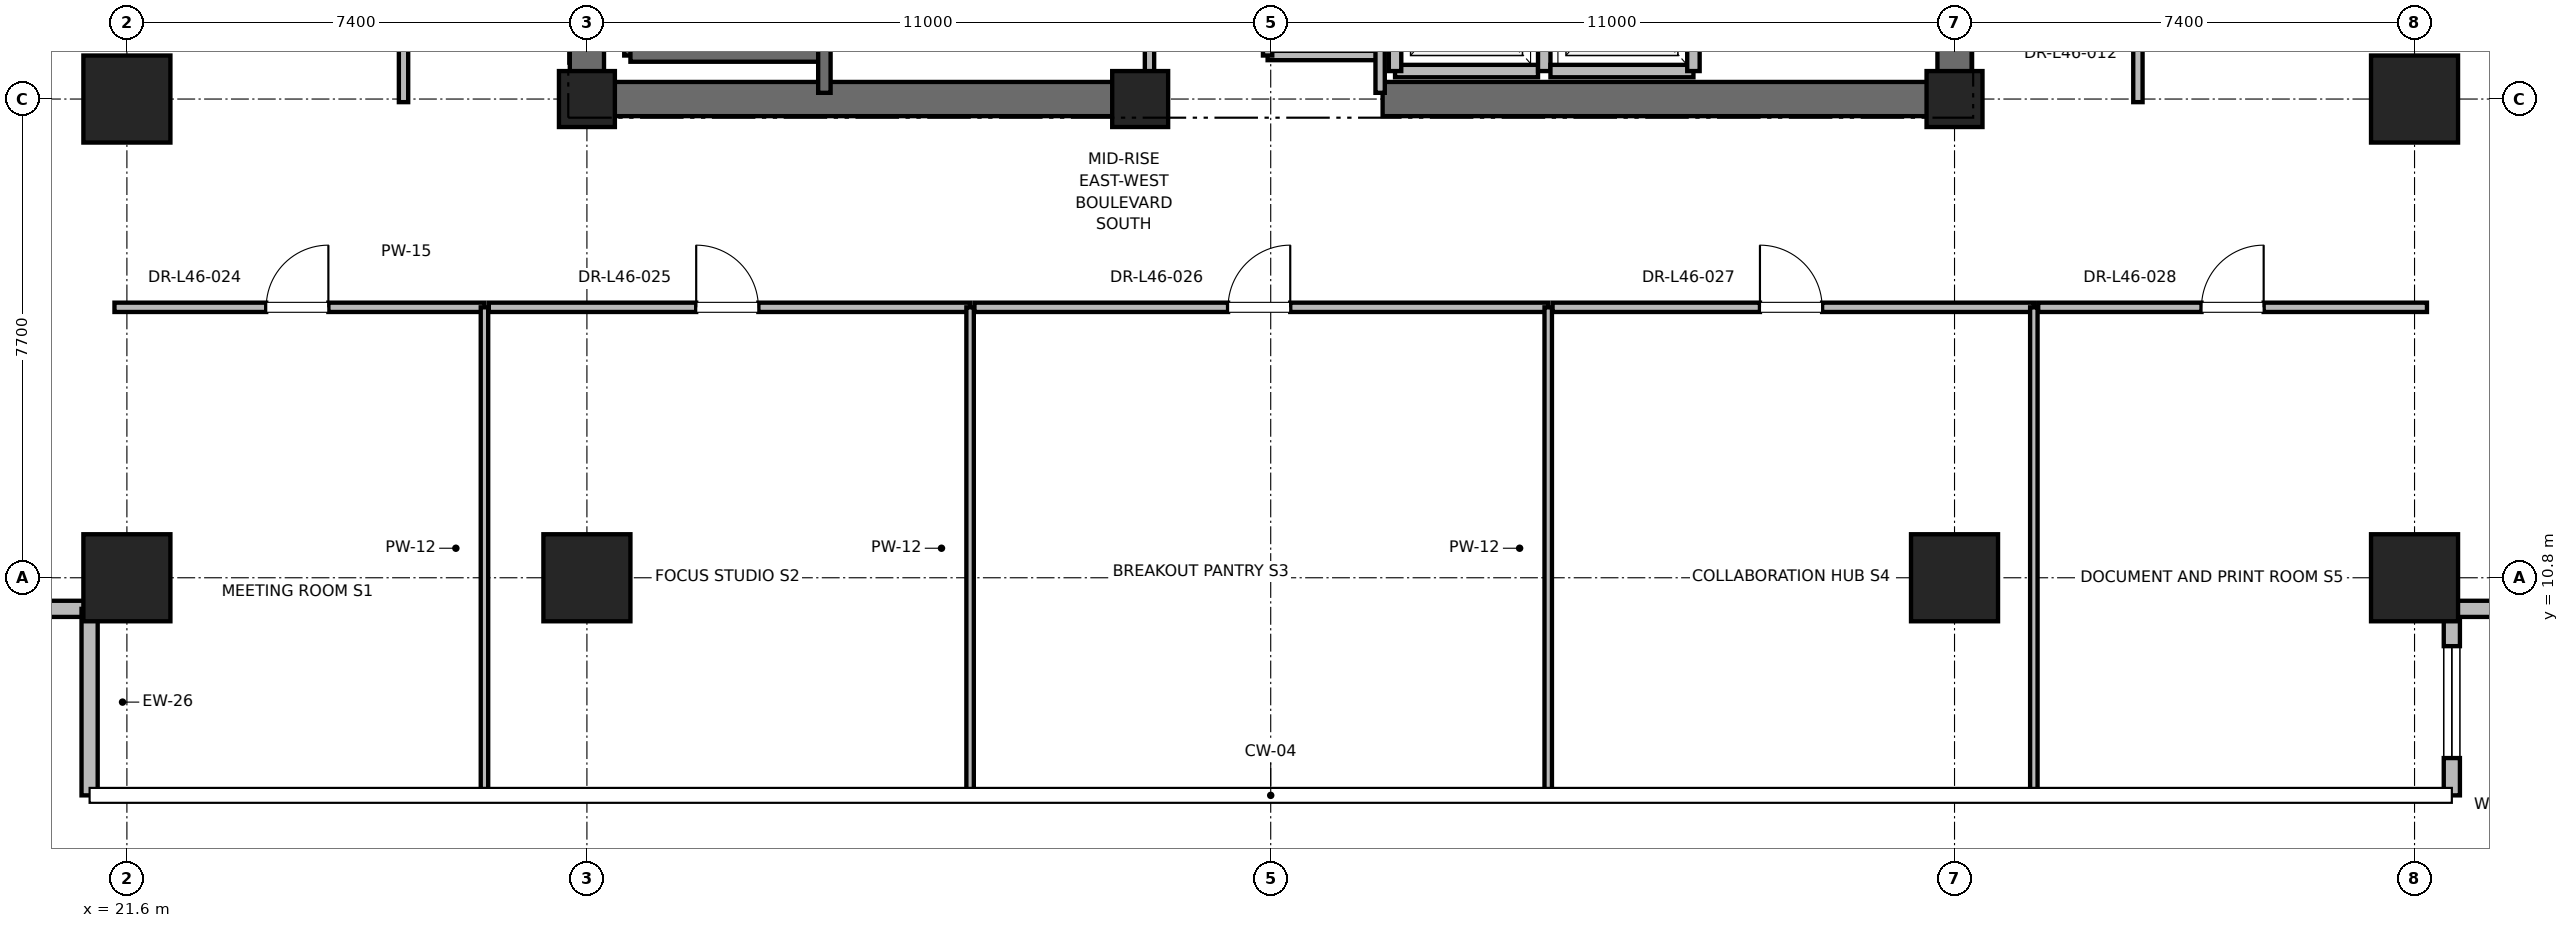
"""IFC4 building model, lengths in metres.
Left out: names, types, materials, properties, quantities, classifications, styles, units other than length and angle.
Written with IfcOpenShell. Run it as: python <this file> out.ifc"""

import sys

from ifc_helpers import new_model, si_unit, direction, frame, frame_2d, origin, origin_2d, place, context, subcontext, project, spatial, rectangle, extrude, element, fill, save


model = new_model("IFC4")
c1 = context("Model", 3, precision=1e-05, world=origin(), true_north=direction((0.0, 1.0)))
c2 = subcontext(c1, "Body", "Model", "MODEL_VIEW")
j1 = project(units=[si_unit("LENGTHUNIT", "METRE"), si_unit("PLANEANGLEUNIT", "RADIAN")], contexts=[c1])
p1 = place(None, origin())
s1 = spatial("IfcSite", under=j1, at=p1, CompositionType="ELEMENT")
p2 = place(p1, origin())
s2 = spatial("IfcBuilding", under=s1, at=p2, CompositionType="ELEMENT")
p3 = place(p2, frame((0.0, 0.0, 200.2)))
s3 = spatial("IfcBuildingStorey", under=s2, at=p3, CompositionType="ELEMENT", Elevation=200.2)
for number, where, z_axis, x_axis in (
    (1, (29.0, 10.8, 0.0), (0.0, 0.0, 1.0), (1.0, 0.0, 0.0)),
    (2, (51.0, 10.8, 0.0), (0.0, 0.0, 1.0), (1.0, 0.0, 0.0)),
    (3, (21.6, 18.5, 0.0), (0.0, 0.0, 1.0), (1.0, 0.0, 0.0)),
    (4, (58.4, 18.5, 0.0), (0.0, 0.0, 1.0), (1.0, 0.0, 0.0)),
    (5, (21.6, 10.8, 0.0), (0.0, 0.0, 1.0), (1.0, 0.0, 0.0)),
    (6, (58.4, 10.8, 0.0), (0.0, 0.0, 1.0), (1.0, 0.0, 0.0)),
):
    element("IfcColumn", number, at=place(p3, frame(where, z_axis=z_axis, x_axis=x_axis)), inside=s3, PredefinedType="COLUMN", context=c2, shape_type="SweptSolid", body=[
        extrude(rectangle(XDim=1.4, YDim=1.4, at=origin_2d()), origin(), (0.0, 0.0, 1.0), 5.0),
    ])
for number, where, z_axis, x_axis in (
    (7, (29.0, 18.5, 0.0), (0.0, 0.0, 1.0), (1.0, 0.0, 0.0)),
    (8, (51.0, 18.5, 0.0), (0.0, 0.0, 1.0), (1.0, 0.0, 0.0)),
    (9, (37.9, 18.5, 0.0), (0.0, 0.0, 1.0), (1.0, 0.0, 0.0)),
):
    element("IfcColumn", number, at=place(p3, frame(where, z_axis=z_axis, x_axis=x_axis)), inside=s3, PredefinedType="PILASTER", context=c2, shape_type="SweptSolid", body=[
        extrude(rectangle(XDim=0.9, YDim=0.9, at=origin_2d()), origin(), (0.0, 0.0, 1.0), 5.0),
    ])
for number, where, z_axis, x_axis in (
    (10, (29.0, 18.5, 0.0), (0.0, 0.0, 1.0), (1.0, 0.0, 0.0)),
    (11, (41.8, 18.5, 0.0), (0.0, 0.0, 1.0), (1.0, 0.0, 0.0)),
):
    element("IfcWall", number, at=place(p3, frame(where, z_axis=z_axis, x_axis=x_axis)), inside=s3, PredefinedType="SHEAR", context=c2, shape_type="SweptSolid", body=[
        extrude(rectangle(XDim=9.2, YDim=0.55, at=frame_2d((4.6, 0.0))), origin(), (0.0, 0.0, 1.0), 4.775),
    ])
p4 = place(p3, frame((29.0, 18.5, 0.0), z_axis=(0.0, 0.0, 1.0), x_axis=(0.0, 1.0, 0.0)))
e12 = element("IfcWall", 12, at=p4, inside=s3, PredefinedType="SHEAR", context=c2, shape_type="SweptSolid", body=[
    extrude(rectangle(XDim=8.8, YDim=0.55, at=frame_2d((4.4, 0.0))), origin(), (0.0, 0.0, 1.0), 4.775),
])
p5 = place(p3, frame((51.0, 18.5, 0.0), z_axis=(0.0, 0.0, 1.0), x_axis=(0.0, 1.0, 0.0)))
e13 = element("IfcWall", 13, at=p5, inside=s3, PredefinedType="SHEAR", context=c2, shape_type="SweptSolid", body=[
    extrude(rectangle(XDim=5.8, YDim=0.55, at=frame_2d((2.9, 0.0))), origin(), (0.0, 0.0, 1.0), 4.775),
])
p6 = place(p3, frame((17.6, 10.3, 0.0), z_axis=(0.0, 0.0, 1.0), x_axis=(1.0, 0.0, 0.0)))
e14 = element("IfcWall", 14, at=p6, inside=s3, PredefinedType="PARAPET", context=c2, shape_type="SweptSolid", body=[
    extrude(rectangle(XDim=3.4, YDim=0.26, at=frame_2d((1.7, 0.0))), origin(), (0.0, 0.0, 1.0), 4.775),
])
p7 = place(p6, frame((0.8, 0.0, 0.85)))
e15 = element("IfcOpeningElement", 15, at=p7, cuts=e14, PredefinedType="OPENING", context=c2, shape_type="SweptSolid", body=[
    extrude(rectangle(XDim=1.8, YDim=2.2, at=frame_2d((0.9, 1.1))), frame((0.0, 0.13, 0.0), z_axis=(0.0, -1.0, 0.0), x_axis=(1.0, 0.0, 0.0)), (0.0, 0.0, 1.0), 0.26),
])
p8 = place(p3, frame((21.0, 10.3, 0.0), z_axis=(0.0, 0.0, 1.0), x_axis=(0.0, -1.0, 0.0)))
e16 = element("IfcWall", 16, at=p8, inside=s3, PredefinedType="PARAPET", context=c2, shape_type="SweptSolid", body=[
    extrude(rectangle(XDim=3.0, YDim=0.26, at=frame_2d((1.5, 0.0))), origin(), (0.0, 0.0, 1.0), 4.775),
])
p9 = place(p3, frame((59.0, 7.3, 0.0), z_axis=(0.0, 0.0, 1.0), x_axis=(0.0, 1.0, 0.0)))
e17 = element("IfcWall", 17, at=p9, inside=s3, PredefinedType="PARAPET", context=c2, shape_type="SweptSolid", body=[
    extrude(rectangle(XDim=3.0, YDim=0.26, at=frame_2d((1.5, 0.0))), origin(), (0.0, 0.0, 1.0), 4.775),
])
p10 = place(p9, frame((0.6, 0.0, 0.85)))
e18 = element("IfcOpeningElement", 18, at=p10, cuts=e17, PredefinedType="OPENING", context=c2, shape_type="SweptSolid", body=[
    extrude(rectangle(XDim=1.8, YDim=2.2, at=frame_2d((0.9, 1.1))), frame((0.0, 0.13, 0.0), z_axis=(0.0, -1.0, 0.0), x_axis=(1.0, 0.0, 0.0)), (0.0, 0.0, 1.0), 0.26),
])
p11 = place(p3, frame((59.0, 10.3, 0.0), z_axis=(0.0, 0.0, 1.0), x_axis=(1.0, 0.0, 0.0)))
e19 = element("IfcWall", 19, at=p11, inside=s3, PredefinedType="PARAPET", context=c2, shape_type="SweptSolid", body=[
    extrude(rectangle(XDim=3.4, YDim=0.26, at=frame_2d((1.7, 0.0))), origin(), (0.0, 0.0, 1.0), 4.775),
])
p12 = place(p3, frame((29.7, 19.2, 0.0), z_axis=(0.0, 0.0, 1.0), x_axis=(0.0, 1.0, 0.0)))
e20 = element("IfcWall", 20, at=p12, inside=s3, PredefinedType="SOLIDWALL", context=c2, shape_type="SweptSolid", body=[
    extrude(rectangle(XDim=8.15, YDim=0.2, at=frame_2d((4.075, 0.0))), origin(), (0.0, 0.0, 1.0), 4.775),
])
p13 = place(p3, frame((29.7, 19.2, 0.0), z_axis=(0.0, 0.0, 1.0), x_axis=(1.0, 0.0, 0.0)))
e21 = element("IfcWall", 21, at=p13, inside=s3, PredefinedType="SOLIDWALL", context=c2, shape_type="SweptSolid", body=[
    extrude(rectangle(XDim=3.12, YDim=0.2, at=frame_2d((1.56, 0.0))), origin(), (0.0, 0.0, 1.0), 4.775),
])
p14 = place(p3, frame((32.82, 18.6, 0.0), z_axis=(0.0, 0.0, 1.0), x_axis=(0.0, 1.0, 0.0)))
e22 = element("IfcWall", 22, at=p14, inside=s3, PredefinedType="SOLIDWALL", context=c2, shape_type="SweptSolid", body=[
    extrude(rectangle(XDim=8.78, YDim=0.2, at=frame_2d((4.39, 0.0))), origin(), (0.0, 0.0, 1.0), 4.775),
])
p15 = place(p3, frame((42.0, 18.95, 0.0), z_axis=(0.0, 0.0, 1.0), x_axis=(1.0, 0.0, 0.0)))
e23 = element("IfcWall", 23, at=p15, inside=s3, PredefinedType="SOLIDWALL", context=c2, shape_type="SweptSolid", body=[
    extrude(rectangle(XDim=2.3, YDim=0.2, at=frame_2d((1.15, 0.0))), origin(), (0.0, 0.0, 1.0), 3.755),
])
p16 = place(p3, frame((42.0, 21.55, 0.0), z_axis=(0.0, 0.0, 1.0), x_axis=(0.0, -1.0, 0.0)))
e24 = element("IfcWall", 24, at=p16, inside=s3, PredefinedType="SOLIDWALL", context=c2, shape_type="SweptSolid", body=[
    extrude(rectangle(XDim=2.6, YDim=0.2, at=frame_2d((1.3, 0.0))), origin(), (0.0, 0.0, 1.0), 3.755),
])
p17 = place(p3, frame((44.4, 18.95, 0.0), z_axis=(0.0, 0.0, 1.0), x_axis=(0.0, 1.0, 0.0)))
e25 = element("IfcWall", 25, at=p17, inside=s3, PredefinedType="SOLIDWALL", context=c2, shape_type="SweptSolid", body=[
    extrude(rectangle(XDim=2.6, YDim=0.2, at=frame_2d((1.3, 0.0))), origin(), (0.0, 0.0, 1.0), 4.775),
])
p18 = place(p3, frame((44.5, 18.95, 0.0), z_axis=(0.0, 0.0, 1.0), x_axis=(1.0, 0.0, 0.0)))
e26 = element("IfcWall", 26, at=p18, inside=s3, PredefinedType="SOLIDWALL", context=c2, shape_type="SweptSolid", body=[
    extrude(rectangle(XDim=2.3, YDim=0.2, at=frame_2d((1.15, 0.0))), origin(), (0.0, 0.0, 1.0), 4.775),
])
p19 = place(p3, frame((46.8, 18.95, 0.0), z_axis=(0.0, 0.0, 1.0), x_axis=(0.0, 1.0, 0.0)))
e27 = element("IfcWall", 27, at=p19, inside=s3, PredefinedType="SOLIDWALL", context=c2, shape_type="SweptSolid", body=[
    extrude(rectangle(XDim=2.6, YDim=0.2, at=frame_2d((1.3, 0.0))), origin(), (0.0, 0.0, 1.0), 4.775),
])
p20 = place(p3, frame((39.95, 19.2, 0.0), z_axis=(0.0, 0.0, 1.0), x_axis=(1.0, 0.0, 0.0)))
e28 = element("IfcWall", 28, at=p20, inside=s3, PredefinedType="PARTITIONING", context=c2, shape_type="SweptSolid", body=[
    extrude(rectangle(XDim=1.81, YDim=0.15, at=frame_2d((0.905, 0.0))), origin(), (0.0, 0.0, 1.0), 2.85),
])
p21 = place(p3, frame((41.76, 18.6, 0.0), z_axis=(0.0, 0.0, 1.0), x_axis=(0.0, 1.0, 0.0)))
e29 = element("IfcWall", 29, at=p21, inside=s3, PredefinedType="PARTITIONING", context=c2, shape_type="SweptSolid", body=[
    extrude(rectangle(XDim=3.6, YDim=0.15, at=frame_2d((1.8, 0.0))), origin(), (0.0, 0.0, 1.0), 2.85),
])
p22 = place(p3, frame((39.95, 19.2, 0.0), z_axis=(0.0, 0.0, 1.0), x_axis=(0.0, 1.0, 0.0)))
e30 = element("IfcWall", 30, at=p22, inside=s3, PredefinedType="PARTITIONING", context=c2, shape_type="SweptSolid", body=[
    extrude(rectangle(XDim=3.0, YDim=0.15, at=frame_2d((1.5, 0.0))), origin(), (0.0, 0.0, 1.0), 2.85),
])
p23 = place(p22, frame((1.05, 0.0, 0.0)))
e31 = element("IfcOpeningElement", 31, at=p23, cuts=e30, PredefinedType="OPENING", context=c2, shape_type="SweptSolid", body=[
    extrude(rectangle(XDim=0.9, YDim=2.1, at=frame_2d((0.45, 1.05))), frame((0.0, 0.075, 0.0), z_axis=(0.0, -1.0, 0.0), x_axis=(1.0, 0.0, 0.0)), (0.0, 0.0, 1.0), 0.15),
])
p24 = place(p3, frame((38.05, 18.6, 0.0), z_axis=(0.0, 0.0, 1.0), x_axis=(0.0, 1.0, 0.0)))
e32 = element("IfcWall", 32, at=p24, inside=s3, PredefinedType="PARTITIONING", context=c2, shape_type="SweptSolid", body=[
    extrude(rectangle(XDim=8.78, YDim=0.15, at=frame_2d((4.39, 0.0))), origin(), (0.0, 0.0, 1.0), 2.85),
])
p25 = place(p24, frame((3.89, 0.0, 0.0)))
e33 = element("IfcOpeningElement", 33, at=p25, cuts=e32, PredefinedType="OPENING", context=c2, shape_type="SweptSolid", body=[
    extrude(rectangle(XDim=1.0, YDim=2.15, at=frame_2d((0.5, 1.075))), frame((0.0, 0.075, 0.0), z_axis=(0.0, -1.0, 0.0), x_axis=(1.0, 0.0, 0.0)), (0.0, 0.0, 1.0), 0.15),
])
p26 = place(p3, frame((21.4, 15.15, 0.0), z_axis=(0.0, 0.0, 1.0), x_axis=(1.0, 0.0, 0.0)))
e34 = element("IfcWall", 34, at=p26, inside=s3, PredefinedType="PARTITIONING", context=c2, shape_type="SweptSolid", body=[
    extrude(rectangle(XDim=5.952, YDim=0.15, at=frame_2d((2.976, 0.0))), origin(), (0.0, 0.0, 1.0), 2.85),
])
p27 = place(p26, frame((2.441, 0.0, 0.0)))
e35 = element("IfcOpeningElement", 35, at=p27, cuts=e34, PredefinedType="OPENING", context=c2, shape_type="SweptSolid", body=[
    extrude(rectangle(XDim=1.0, YDim=2.15, at=frame_2d((0.5, 1.075))), frame((0.0, 0.075, 0.0), z_axis=(0.0, -1.0, 0.0), x_axis=(1.0, 0.0, 0.0)), (0.0, 0.0, 1.0), 0.15),
])
p28 = place(p3, frame((27.352, 7.4, 0.0), z_axis=(0.0, 0.0, 1.0), x_axis=(0.0, 1.0, 0.0)))
e36 = element("IfcWall", 36, at=p28, inside=s3, PredefinedType="PARTITIONING", context=c2, shape_type="SweptSolid", body=[
    extrude(rectangle(XDim=7.75, YDim=0.12, at=frame_2d((3.875, 0.0))), origin(), (0.0, 0.0, 1.0), 2.85),
])
p29 = place(p3, frame((27.422, 15.15, 0.0), z_axis=(0.0, 0.0, 1.0), x_axis=(1.0, 0.0, 0.0)))
e37 = element("IfcWall", 37, at=p29, inside=s3, PredefinedType="PARTITIONING", context=c2, shape_type="SweptSolid", body=[
    extrude(rectangle(XDim=7.742, YDim=0.15, at=frame_2d((3.871, 0.0))), origin(), (0.0, 0.0, 1.0), 2.85),
])
p30 = place(p29, frame((3.336, 0.0, 0.0)))
e38 = element("IfcOpeningElement", 38, at=p30, cuts=e37, PredefinedType="OPENING", context=c2, shape_type="SweptSolid", body=[
    extrude(rectangle(XDim=1.0, YDim=2.15, at=frame_2d((0.5, 1.075))), frame((0.0, 0.075, 0.0), z_axis=(0.0, -1.0, 0.0), x_axis=(1.0, 0.0, 0.0)), (0.0, 0.0, 1.0), 0.15),
])
p31 = place(p3, frame((35.164, 7.4, 0.0), z_axis=(0.0, 0.0, 1.0), x_axis=(0.0, 1.0, 0.0)))
e39 = element("IfcWall", 39, at=p31, inside=s3, PredefinedType="PARTITIONING", context=c2, shape_type="SweptSolid", body=[
    extrude(rectangle(XDim=7.75, YDim=0.12, at=frame_2d((3.875, 0.0))), origin(), (0.0, 0.0, 1.0), 2.85),
])
p32 = place(p3, frame((35.234, 15.15, 0.0), z_axis=(0.0, 0.0, 1.0), x_axis=(1.0, 0.0, 0.0)))
e40 = element("IfcWall", 40, at=p32, inside=s3, PredefinedType="PARTITIONING", context=c2, shape_type="SweptSolid", body=[
    extrude(rectangle(XDim=9.23, YDim=0.15, at=frame_2d((4.615, 0.0))), origin(), (0.0, 0.0, 1.0), 2.85),
])
p33 = place(p32, frame((4.08, 0.0, 0.0)))
e41 = element("IfcOpeningElement", 41, at=p33, cuts=e40, PredefinedType="OPENING", context=c2, shape_type="SweptSolid", body=[
    extrude(rectangle(XDim=1.0, YDim=2.15, at=frame_2d((0.5, 1.075))), frame((0.0, 0.075, 0.0), z_axis=(0.0, -1.0, 0.0), x_axis=(1.0, 0.0, 0.0)), (0.0, 0.0, 1.0), 0.15),
])
p34 = place(p3, frame((44.464, 7.4, 0.0), z_axis=(0.0, 0.0, 1.0), x_axis=(0.0, 1.0, 0.0)))
e42 = element("IfcWall", 42, at=p34, inside=s3, PredefinedType="PARTITIONING", context=c2, shape_type="SweptSolid", body=[
    extrude(rectangle(XDim=7.75, YDim=0.12, at=frame_2d((3.875, 0.0))), origin(), (0.0, 0.0, 1.0), 2.85),
])
p35 = place(p3, frame((44.534, 15.15, 0.0), z_axis=(0.0, 0.0, 1.0), x_axis=(1.0, 0.0, 0.0)))
e43 = element("IfcWall", 43, at=p35, inside=s3, PredefinedType="PARTITIONING", context=c2, shape_type="SweptSolid", body=[
    extrude(rectangle(XDim=7.742, YDim=0.15, at=frame_2d((3.871, 0.0))), origin(), (0.0, 0.0, 1.0), 2.85),
])
p36 = place(p35, frame((3.336, 0.0, 0.0)))
e44 = element("IfcOpeningElement", 44, at=p36, cuts=e43, PredefinedType="OPENING", context=c2, shape_type="SweptSolid", body=[
    extrude(rectangle(XDim=1.0, YDim=2.15, at=frame_2d((0.5, 1.075))), frame((0.0, 0.075, 0.0), z_axis=(0.0, -1.0, 0.0), x_axis=(1.0, 0.0, 0.0)), (0.0, 0.0, 1.0), 0.15),
])
p37 = place(p3, frame((52.276, 7.4, 0.0), z_axis=(0.0, 0.0, 1.0), x_axis=(0.0, 1.0, 0.0)))
e45 = element("IfcWall", 45, at=p37, inside=s3, PredefinedType="PARTITIONING", context=c2, shape_type="SweptSolid", body=[
    extrude(rectangle(XDim=7.75, YDim=0.12, at=frame_2d((3.875, 0.0))), origin(), (0.0, 0.0, 1.0), 2.85),
])
p38 = place(p3, frame((52.346, 15.15, 0.0), z_axis=(0.0, 0.0, 1.0), x_axis=(1.0, 0.0, 0.0)))
e46 = element("IfcWall", 46, at=p38, inside=s3, PredefinedType="PARTITIONING", context=c2, shape_type="SweptSolid", body=[
    extrude(rectangle(XDim=6.254, YDim=0.15, at=frame_2d((3.127, 0.0))), origin(), (0.0, 0.0, 1.0), 2.85),
])
p39 = place(p38, frame((2.627, 0.0, 0.0)))
e47 = element("IfcOpeningElement", 47, at=p39, cuts=e46, PredefinedType="OPENING", context=c2, shape_type="SweptSolid", body=[
    extrude(rectangle(XDim=1.0, YDim=2.15, at=frame_2d((0.5, 1.075))), frame((0.0, 0.075, 0.0), z_axis=(0.0, -1.0, 0.0), x_axis=(1.0, 0.0, 0.0)), (0.0, 0.0, 1.0), 0.15),
])
p40 = place(p3, frame((26.05, 18.45, 0.0), z_axis=(0.0, 0.0, 1.0), x_axis=(0.0, 1.0, 0.0)))
e48 = element("IfcWall", 48, at=p40, inside=s3, PredefinedType="PARTITIONING", context=c2, shape_type="SweptSolid", body=[
    extrude(rectangle(XDim=5.249, YDim=0.15, at=frame_2d((2.625, 0.0))), origin(), (0.0, 0.0, 1.0), 2.85),
])
p41 = place(p40, frame((2.165, 0.0, 0.0)))
e49 = element("IfcOpeningElement", 49, at=p41, cuts=e48, PredefinedType="OPENING", context=c2, shape_type="SweptSolid", body=[
    extrude(rectangle(XDim=1.0, YDim=2.15, at=frame_2d((0.5, 1.075))), frame((0.0, 0.075, 0.0), z_axis=(0.0, -1.0, 0.0), x_axis=(1.0, 0.0, 0.0)), (0.0, 0.0, 1.0), 0.15),
])
p42 = place(p3, frame((53.95, 18.45, 0.0), z_axis=(0.0, 0.0, 1.0), x_axis=(0.0, 1.0, 0.0)))
e50 = element("IfcWall", 50, at=p42, inside=s3, PredefinedType="PARTITIONING", context=c2, shape_type="SweptSolid", body=[
    extrude(rectangle(XDim=3.982, YDim=0.15, at=frame_2d((1.991, 0.0))), origin(), (0.0, 0.0, 1.0), 2.85),
])
p43 = place(p42, frame((1.531, 0.0, 0.0)))
e51 = element("IfcOpeningElement", 51, at=p43, cuts=e50, PredefinedType="OPENING", context=c2, shape_type="SweptSolid", body=[
    extrude(rectangle(XDim=1.0, YDim=2.15, at=frame_2d((0.5, 1.075))), frame((0.0, 0.075, 0.0), z_axis=(0.0, -1.0, 0.0), x_axis=(1.0, 0.0, 0.0)), (0.0, 0.0, 1.0), 0.15),
])
p44 = place(p10, origin())
e52 = element("IfcWindow", 52, at=p44, inside=s3, PartitioningType="SINGLE_PANEL", PredefinedType="WINDOW", context=c2, shape_type="SweptSolid", body=[
    extrude(rectangle(XDim=1.8, YDim=2.2, at=frame_2d((0.9, 1.1))), frame((0.0, 0.03, 0.0), z_axis=(0.0, -1.0, 0.0), x_axis=(1.0, 0.0, 0.0)), (0.0, 0.0, 1.0), 0.06),
])
fill(e18, e52)
p45 = place(p27, origin())
e53 = element("IfcDoor", 53, at=p45, inside=s3, OperationType="SINGLE_SWING_RIGHT", PredefinedType="DOOR", context=c2, shape_type="SweptSolid", body=[
    extrude(rectangle(XDim=1.0, YDim=2.15, at=frame_2d((0.5, 1.075))), frame((0.0, 0.025, 0.0), z_axis=(0.0, -1.0, 0.0), x_axis=(1.0, 0.0, 0.0)), (0.0, 0.0, 1.0), 0.05),
])
fill(e35, e53)
p46 = place(p30, origin())
e54 = element("IfcDoor", 54, at=p46, inside=s3, OperationType="SINGLE_SWING_LEFT", PredefinedType="DOOR", context=c2, shape_type="SweptSolid", body=[
    extrude(rectangle(XDim=1.0, YDim=2.15, at=frame_2d((0.5, 1.075))), frame((0.0, 0.025, 0.0), z_axis=(0.0, -1.0, 0.0), x_axis=(1.0, 0.0, 0.0)), (0.0, 0.0, 1.0), 0.05),
])
fill(e38, e54)
p47 = place(p33, origin())
e55 = element("IfcDoor", 55, at=p47, inside=s3, OperationType="SINGLE_SWING_RIGHT", PredefinedType="DOOR", context=c2, shape_type="SweptSolid", body=[
    extrude(rectangle(XDim=1.0, YDim=2.15, at=frame_2d((0.5, 1.075))), frame((0.0, 0.025, 0.0), z_axis=(0.0, -1.0, 0.0), x_axis=(1.0, 0.0, 0.0)), (0.0, 0.0, 1.0), 0.05),
])
fill(e41, e55)
p48 = place(p36, origin())
e56 = element("IfcDoor", 56, at=p48, inside=s3, OperationType="SINGLE_SWING_LEFT", PredefinedType="DOOR", context=c2, shape_type="SweptSolid", body=[
    extrude(rectangle(XDim=1.0, YDim=2.15, at=frame_2d((0.5, 1.075))), frame((0.0, 0.025, 0.0), z_axis=(0.0, -1.0, 0.0), x_axis=(1.0, 0.0, 0.0)), (0.0, 0.0, 1.0), 0.05),
])
fill(e44, e56)
p49 = place(p39, origin())
e57 = element("IfcDoor", 57, at=p49, inside=s3, OperationType="SINGLE_SWING_RIGHT", PredefinedType="DOOR", context=c2, shape_type="SweptSolid", body=[
    extrude(rectangle(XDim=1.0, YDim=2.15, at=frame_2d((0.5, 1.075))), frame((0.0, 0.025, 0.0), z_axis=(0.0, -1.0, 0.0), x_axis=(1.0, 0.0, 0.0)), (0.0, 0.0, 1.0), 0.05),
])
fill(e47, e57)
save(model, sys.argv[1])
